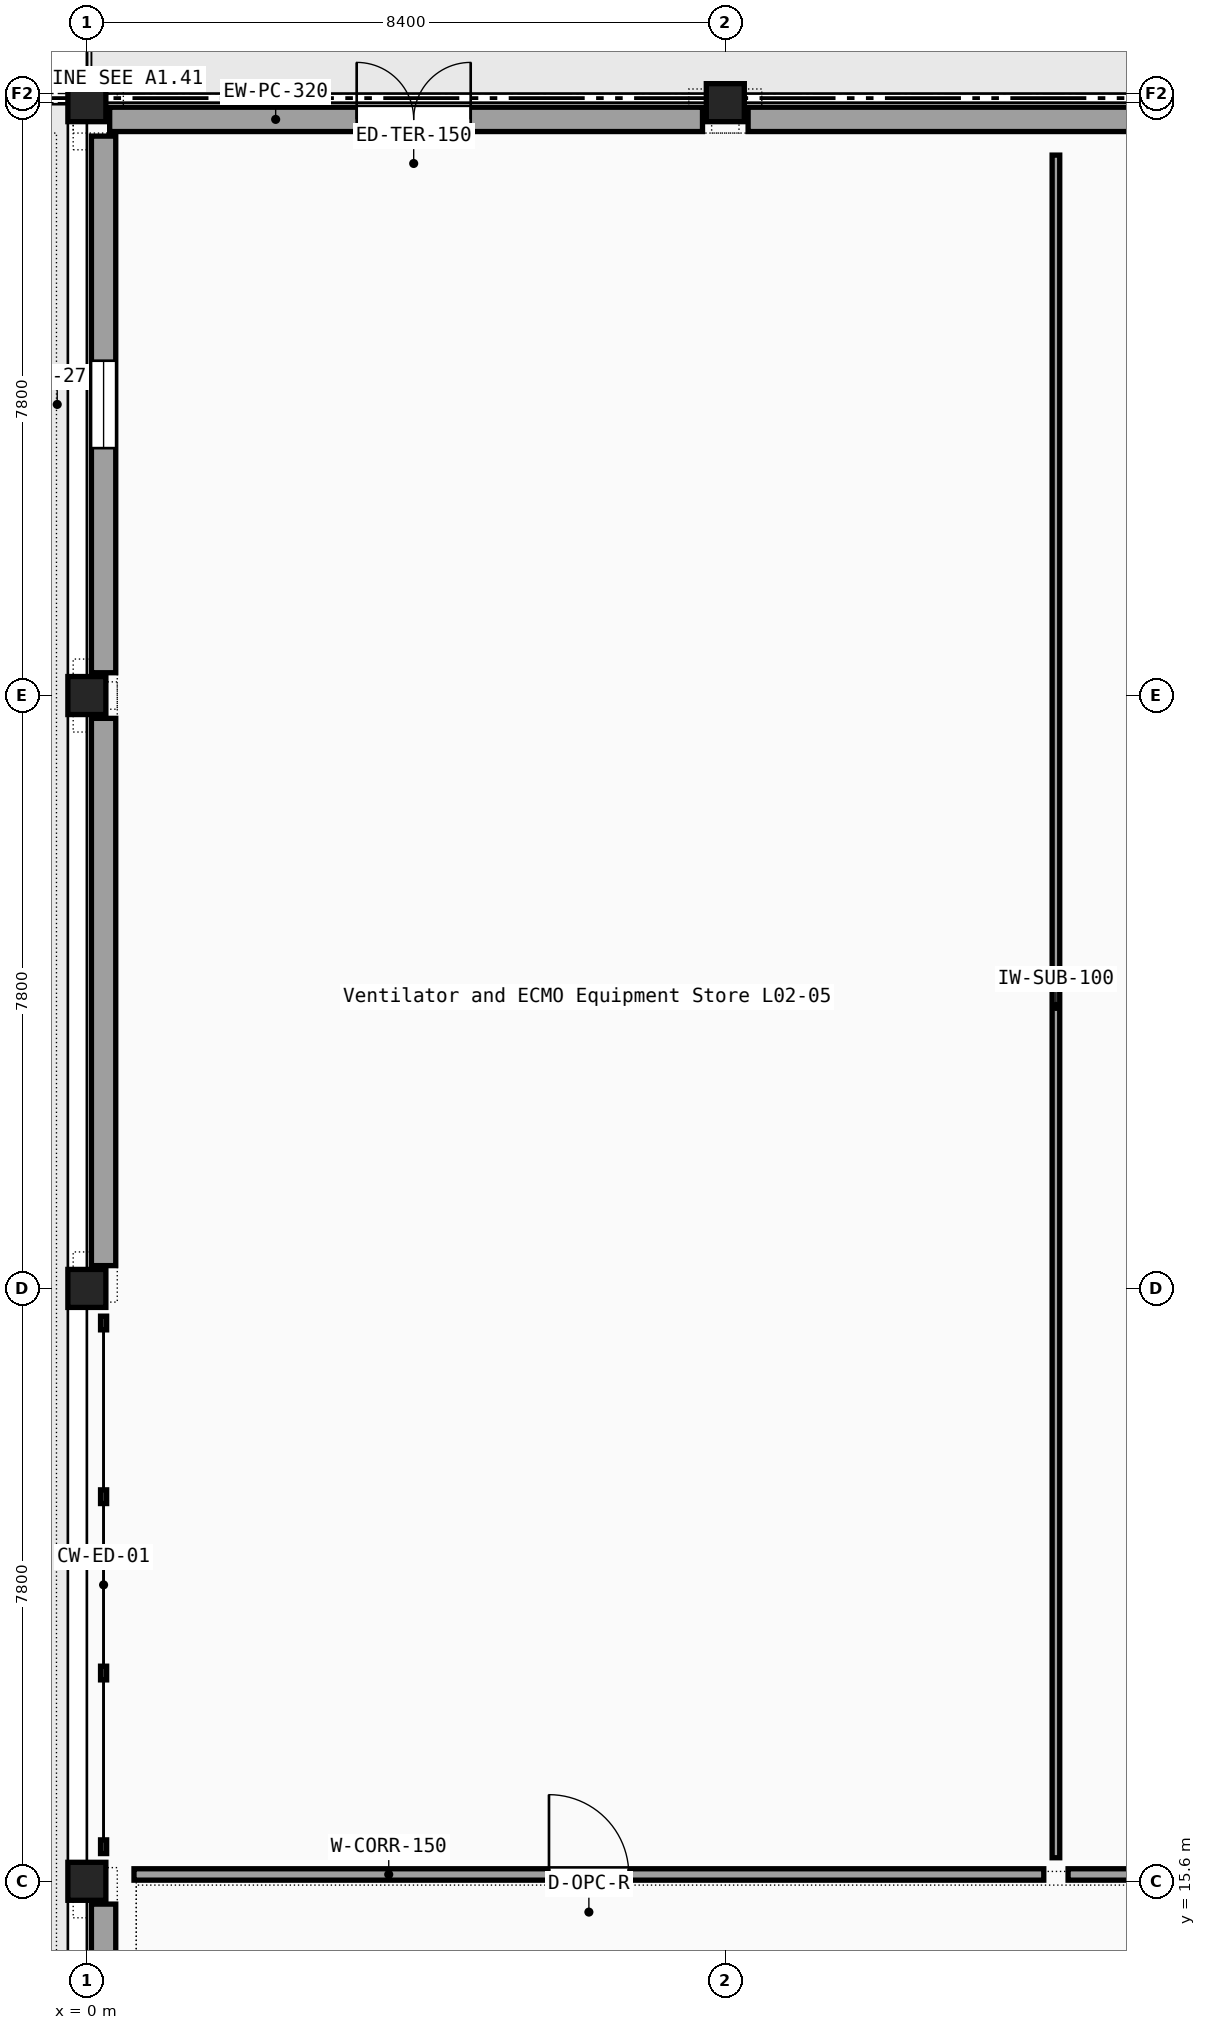
"""IFC4 building model, lengths in metres.
Left out: names, types, materials, properties, quantities, classifications, styles, units other than length and angle.
Written with IfcOpenShell. Run it as: python <this file> out.ifc"""

import sys

from ifc_helpers import new_model, si_unit, direction, frame, frame_2d, origin, origin_2d, place, context, subcontext, project, spatial, rectangle, extrude, element, fill, save


model = new_model("IFC4")
c1 = context("Model", 3, precision=1e-05, world=origin(), true_north=direction((0.0, 1.0)))
c2 = subcontext(c1, "Body", "Model", "MODEL_VIEW")
j1 = project(units=[si_unit("LENGTHUNIT", "METRE"), si_unit("PLANEANGLEUNIT", "RADIAN")], contexts=[c1])
p1 = place(None, origin())
s1 = spatial("IfcSite", under=j1, at=p1, CompositionType="ELEMENT")
p2 = place(p1, origin())
s2 = spatial("IfcBuilding", under=s1, at=p2, CompositionType="ELEMENT")
p3 = place(p2, frame((0.0, 0.0, 10.2)))
s3 = spatial("IfcBuildingStorey", under=s2, at=p3, CompositionType="ELEMENT", Elevation=10.2)
for number, where, z_axis, x_axis in (
    (1, (0.0, 15.6, 0.0), (0.0, 0.0, 1.0), (1.0, 0.0, 0.0)),
    (2, (0.0, 23.4, 0.0), (0.0, 0.0, 1.0), (1.0, 0.0, 0.0)),
    (3, (0.0, 31.2, 0.0), (0.0, 0.0, 1.0), (1.0, 0.0, 0.0)),
    (4, (0.0, 39.0, 0.0), (0.0, 0.0, 1.0), (1.0, 0.0, 0.0)),
    (5, (8.4, 39.0, 0.0), (0.0, 0.0, 1.0), (1.0, 0.0, 0.0)),
):
    element("IfcColumn", number, at=place(p3, frame(where, z_axis=z_axis, x_axis=x_axis)), inside=s3, PredefinedType="COLUMN", context=c2, shape_type="SweptSolid", body=[
        extrude(rectangle(XDim=0.5, YDim=0.5, at=origin_2d()), origin(), (0.0, 0.0, 1.0), 4.65),
    ])
for number, where, z_axis, x_axis in (
    (6, (0.22, 8.1, 0.0), (0.0, 0.0, 1.0), (0.0, 1.0, 0.0)),
    (7, (0.22, 23.7, 0.0), (0.0, 0.0, 1.0), (0.0, 1.0, 0.0)),
):
    element("IfcWall", number, at=place(p3, frame(where, z_axis=z_axis, x_axis=x_axis)), inside=s3, PredefinedType="SOLIDWALL", context=c2, shape_type="SweptSolid", body=[
        extrude(rectangle(XDim=7.2, YDim=0.32, at=frame_2d((3.6, 0.0))), origin(), (0.0, 0.0, 1.0), 4.04),
    ])
p4 = place(p3, frame((0.22, 31.5, 0.0), z_axis=(0.0, 0.0, 1.0), x_axis=(0.0, 1.0, 0.0)))
e8 = element("IfcWall", 8, at=p4, inside=s3, PredefinedType="SOLIDWALL", context=c2, shape_type="SweptSolid", body=[
    extrude(rectangle(XDim=7.06, YDim=0.32, at=frame_2d((3.53, 0.0))), origin(), (0.0, 0.0, 1.0), 4.04),
])
p5 = place(p4, frame((2.955, 0.0, 0.7)))
e9 = element("IfcOpeningElement", 9, at=p5, cuts=e8, PredefinedType="OPENING", context=c2, shape_type="SweptSolid", body=[
    extrude(rectangle(XDim=1.15, YDim=1.95, at=frame_2d((0.575, 0.975))), frame((0.0, 0.17, 0.0), z_axis=(0.0, -1.0, 0.0), x_axis=(1.0, 0.0, 0.0)), (0.0, 0.0, 1.0), 0.34),
])
p6 = place(p3, frame((0.3, 38.78, 0.0), z_axis=(0.0, 0.0, 1.0), x_axis=(1.0, 0.0, 0.0)))
e10 = element("IfcWall", 10, at=p6, inside=s3, PredefinedType="SOLIDWALL", context=c2, shape_type="SweptSolid", body=[
    extrude(rectangle(XDim=7.8, YDim=0.32, at=frame_2d((3.9, 0.0))), origin(), (0.0, 0.0, 1.0), 4.04),
])
p7 = place(p6, frame((3.25, 0.0, 0.0)))
e11 = element("IfcOpeningElement", 11, at=p7, cuts=e10, PredefinedType="OPENING", context=c2, shape_type="SweptSolid", body=[
    extrude(rectangle(XDim=1.5, YDim=2.2, at=frame_2d((0.75, 1.1))), frame((0.0, 0.17, 0.0), z_axis=(0.0, -1.0, 0.0), x_axis=(1.0, 0.0, 0.0)), (0.0, 0.0, 1.0), 0.34),
])
p8 = place(p3, frame((8.7, 38.78, 0.0), z_axis=(0.0, 0.0, 1.0), x_axis=(1.0, 0.0, 0.0)))
e12 = element("IfcWall", 12, at=p8, inside=s3, PredefinedType="SOLIDWALL", context=c2, shape_type="SweptSolid", body=[
    extrude(rectangle(XDim=7.9, YDim=0.32, at=frame_2d((3.95, 0.0))), origin(), (0.0, 0.0, 1.0), 3.97),
])
p9 = place(p3, frame((0.62, 15.69, 0.0), z_axis=(0.0, 0.0, 1.0), x_axis=(1.0, 0.0, 0.0)))
e13 = element("IfcWall", 13, at=p9, inside=s3, PredefinedType="PARTITIONING", context=c2, shape_type="SweptSolid", body=[
    extrude(rectangle(XDim=11.97, YDim=0.15, at=frame_2d((5.985, 0.0))), origin(), (0.0, 0.0, 1.0), 4.04),
])
p10 = place(p9, frame((5.46, 0.0, 0.0)))
e14 = element("IfcOpeningElement", 14, at=p10, cuts=e13, PredefinedType="OPENING", context=c2, shape_type="SweptSolid", body=[
    extrude(rectangle(XDim=1.05, YDim=2.15, at=frame_2d((0.525, 1.075))), frame((0.0, 0.085, 0.0), z_axis=(0.0, -1.0, 0.0), x_axis=(1.0, 0.0, 0.0)), (0.0, 0.0, 1.0), 0.17),
])
p11 = place(p3, frame((12.75, 15.91, 0.0), z_axis=(0.0, 0.0, 1.0), x_axis=(0.0, 1.0, 0.0)))
e15 = element("IfcWall", 15, at=p11, inside=s3, PredefinedType="PARTITIONING", context=c2, shape_type="SweptSolid", body=[
    extrude(rectangle(XDim=22.4, YDim=0.1, at=frame_2d((11.2, 0.0))), origin(), (0.0, 0.0, 1.0), 4.04),
])
p12 = place(p3, frame((12.91, 15.69, 0.0), z_axis=(0.0, 0.0, 1.0), x_axis=(1.0, 0.0, 0.0)))
e16 = element("IfcWall", 16, at=p12, inside=s3, PredefinedType="PARTITIONING", context=c2, shape_type="SweptSolid", body=[
    extrude(rectangle(XDim=11.97, YDim=0.15, at=frame_2d((5.985, 0.0))), origin(), (0.0, 0.0, 1.0), 4.04),
])
p13 = place(p12, frame((5.51, 0.0, 0.0)))
e17 = element("IfcOpeningElement", 17, at=p13, cuts=e16, PredefinedType="OPENING", context=c2, shape_type="SweptSolid", body=[
    extrude(rectangle(XDim=0.95, YDim=2.1, at=frame_2d((0.475, 1.05))), frame((0.0, 0.085, 0.0), z_axis=(0.0, -1.0, 0.0), x_axis=(1.0, 0.0, 0.0)), (0.0, 0.0, 1.0), 0.17),
])
p14 = place(p5, origin())
e18 = element("IfcWindow", 18, at=p14, inside=s3, PartitioningType="SINGLE_PANEL", PredefinedType="WINDOW", context=c2, shape_type="SweptSolid", body=[
    extrude(rectangle(XDim=1.15, YDim=1.95, at=frame_2d((0.575, 0.975))), frame((0.0, 0.03, 0.0), z_axis=(0.0, -1.0, 0.0), x_axis=(1.0, 0.0, 0.0)), (0.0, 0.0, 1.0), 0.06),
])
fill(e9, e18)
p15 = place(p7, origin())
e19 = element("IfcDoor", 19, at=p15, inside=s3, OperationType="DOUBLE_DOOR_SINGLE_SWING", PredefinedType="DOOR", context=c2, shape_type="SweptSolid", body=[
    extrude(rectangle(XDim=1.5, YDim=2.2, at=frame_2d((0.75, 1.1))), frame((0.0, 0.025, 0.0), z_axis=(0.0, -1.0, 0.0), x_axis=(1.0, 0.0, 0.0)), (0.0, 0.0, 1.0), 0.05),
])
fill(e11, e19)
p16 = place(p10, origin())
e20 = element("IfcDoor", 20, at=p16, inside=s3, OperationType="SINGLE_SWING_LEFT", PredefinedType="DOOR", context=c2, shape_type="SweptSolid", body=[
    extrude(rectangle(XDim=1.05, YDim=2.15, at=frame_2d((0.525, 1.075))), frame((0.0, 0.025, 0.0), z_axis=(0.0, -1.0, 0.0), x_axis=(1.0, 0.0, 0.0)), (0.0, 0.0, 1.0), 0.05),
])
fill(e14, e20)
save(model, sys.argv[1])
